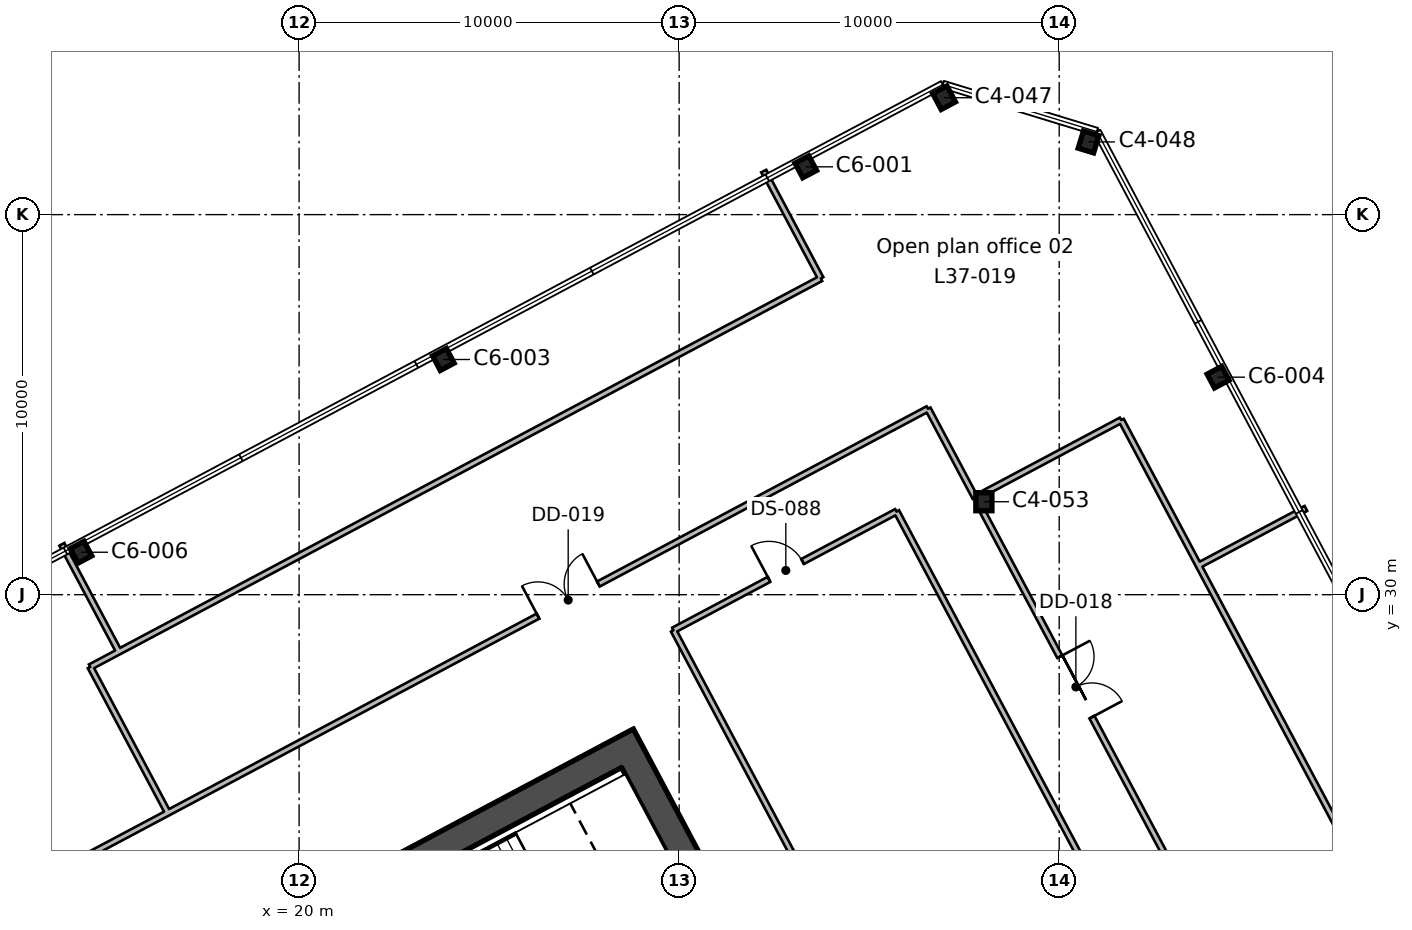
"""IFC4 building model, lengths in metres.
Left out: names, types, materials, properties, quantities, classifications, styles, units other than length and angle.
Written with IfcOpenShell. Run it as: python <this file> out.ifc"""

import sys

from ifc_helpers import new_model, si_unit, direction, frame, frame_2d, origin, origin_2d, place, context, subcontext, project, spatial, rectangle, i_section, extrude, element, fill, save


model = new_model("IFC4")
c1 = context("Model", 3, precision=1e-05, world=origin(), true_north=direction((0.0, 1.0)))
c2 = subcontext(c1, "Body", "Model", "MODEL_VIEW")
j1 = project(units=[si_unit("LENGTHUNIT", "METRE"), si_unit("PLANEANGLEUNIT", "RADIAN")], contexts=[c1])
p1 = place(None, origin())
s1 = spatial("IfcSite", under=j1, at=p1, CompositionType="ELEMENT")
p2 = place(p1, origin())
s2 = spatial("IfcBuilding", under=s1, at=p2, CompositionType="ELEMENT")
p3 = place(p2, frame((0.0, 0.0, 174.2)))
s3 = spatial("IfcBuildingStorey", under=s2, at=p3, CompositionType="ELEMENT", Elevation=174.2)
p4 = place(p3, frame((14.261, 31.117, 0.0), z_axis=(0.0, 0.0, 1.0), x_axis=(-0.882947592859, -0.469471562786, 0.0)))
e1 = element("IfcColumn", 1, at=p4, inside=s3, PredefinedType="COLUMN", context=c2, shape_type="SweptSolid", body=[
    extrude(i_section(OverallWidth=0.412, OverallDepth=0.434, WebThickness=0.036, FlangeThickness=0.057, FilletRadius=0.015, at=origin_2d()), origin(), (0.0, 0.0, 1.0), 4.0),
])
p5 = place(p3, frame((38.018, 32.446, 0.0), z_axis=(0.0, 0.0, 1.0), x_axis=(1.0, 0.0, 0.0)))
e2 = element("IfcColumn", 2, at=p5, inside=s3, PredefinedType="COLUMN", context=c2, shape_type="SweptSolid", body=[
    extrude(i_section(OverallWidth=0.424, OverallDepth=0.475, WebThickness=0.048, FlangeThickness=0.077, FilletRadius=0.015, at=origin_2d()), origin(), (0.0, 0.0, 1.0), 4.0),
])
for number, where, z_axis, x_axis in (
    (3, (44.181, 35.723, 0.0), (0.0, 0.0, 1.0), (-0.469, 0.883, 0.0)),
    (4, (23.796, 36.188, 0.0), (0.0, 0.0, 1.0), (-0.883, -0.469, 0.0)),
    (5, (33.332, 41.258, 0.0), (0.0, 0.0, 1.0), (-0.883, -0.469, 0.0)),
):
    element("IfcColumn", number, at=place(p3, frame(where, z_axis=z_axis, x_axis=x_axis)), inside=s3, PredefinedType="COLUMN", context=c2, shape_type="SweptSolid", body=[
        extrude(i_section(OverallWidth=0.412, OverallDepth=0.434, WebThickness=0.036, FlangeThickness=0.057, FilletRadius=0.015, at=origin_2d()), origin(), (0.0, 0.0, 1.0), 4.0),
    ])
for number, where, z_axis, x_axis in (
    (6, (40.772, 41.913, 0.0), (0.0, 0.0, 1.0), (-0.956, 0.292, 0.0)),
    (7, (36.971, 43.076, 0.0), (0.0, 0.0, 1.0), (-0.883, -0.469, 0.0)),
):
    element("IfcColumn", number, at=place(p3, frame(where, z_axis=z_axis, x_axis=x_axis)), inside=s3, PredefinedType="COLUMN", context=c2, shape_type="SweptSolid", body=[
        extrude(i_section(OverallWidth=0.424, OverallDepth=0.475, WebThickness=0.048, FlangeThickness=0.077, FilletRadius=0.015, at=origin_2d()), origin(), (0.0, 0.0, 1.0), 4.0),
    ])
p6 = place(p3, frame((37.713, 8.896, 0.0), z_axis=(0.0, 0.0, 1.0), x_axis=(-0.469469918705, 0.88294846703, 0.0)))
e8 = element("IfcWall", 8, at=p6, inside=s3, PredefinedType="SHEAR", context=c2, shape_type="SweptSolid", body=[
    extrude(rectangle(XDim=19.7, YDim=0.75, at=frame_2d((9.85, 0.0))), origin(), (0.0, 0.0, 1.0), 4.0),
])
p7 = place(p6, frame((10.45, 0.0, 0.0)))
e9 = element("IfcOpeningElement", 9, at=p7, cuts=e8, PredefinedType="OPENING", context=c2, shape_type="SweptSolid", body=[
    extrude(rectangle(XDim=2.4, YDim=2.4, at=frame_2d((1.2, 1.2))), frame((0.0, 0.385, 0.0), z_axis=(0.0, -1.0, 0.0), x_axis=(1.0, 0.0, 0.0)), (0.0, 0.0, 1.0), 0.77),
])
p8 = place(p3, frame((10.474, 16.3, 0.0), z_axis=(0.0, 0.0, 1.0), x_axis=(0.88295010195, 0.469466843842, 0.0)))
e10 = element("IfcWall", 10, at=p8, inside=s3, PredefinedType="SHEAR", context=c2, shape_type="SweptSolid", body=[
    extrude(rectangle(XDim=20.2, YDim=0.75, at=frame_2d((10.1, 0.0))), origin(), (0.0, 0.0, 1.0), 4.0),
])
p9 = place(p3, frame((0.0, 15.46, 0.0), z_axis=(0.0, 0.0, 1.0), x_axis=(0.882949722977, 0.469467556594, 0.0)))
e11 = element("IfcWall", 11, at=p9, inside=s3, PredefinedType="PARTITIONING", context=c2, shape_type="SweptSolid", body=[
    extrude(rectangle(XDim=20.021, YDim=0.15, at=frame_2d((10.01, 0.0))), origin(), (0.0, 0.0, 1.0), 3.6),
])
p10 = place(p9, frame((9.55, 0.0, 0.0)))
e12 = element("IfcOpeningElement", 12, at=p10, cuts=e11, PredefinedType="OPENING", context=c2, shape_type="SweptSolid", body=[
    extrude(rectangle(XDim=1.0, YDim=2.1, at=frame_2d((0.5, 1.05))), frame((0.0, 0.085, 0.0), z_axis=(0.0, -1.0, 0.0), x_axis=(1.0, 0.0, 0.0)), (0.0, 0.0, 1.0), 0.17),
])
p11 = place(p3, frame((15.761, 25.739, 0.0), z_axis=(0.0, 0.0, 1.0), x_axis=(0.469318416257, -0.883029005278, 0.0)))
e13 = element("IfcWall", 13, at=p11, inside=s3, PredefinedType="PARTITIONING", context=c2, shape_type="SweptSolid", body=[
    extrude(rectangle(XDim=1.677, YDim=0.15, at=frame_2d((0.839, 0.0))), origin(), (0.0, 0.0, 1.0), 3.6),
])
p12 = place(p3, frame((13.757, 31.325, 0.0), z_axis=(0.0, 0.0, 1.0), x_axis=(0.469685095616, -0.882834022315, 0.0)))
e14 = element("IfcWall", 14, at=p12, inside=s3, PredefinedType="PARTITIONING", context=c2, shape_type="SweptSolid", body=[
    extrude(rectangle(XDim=3.2, YDim=0.15, at=frame_2d((1.6, 0.0))), origin(), (0.0, 0.0, 1.0), 3.6),
])
p13 = place(p3, frame((15.258, 28.499, 0.0), z_axis=(0.0, 0.0, 1.0), x_axis=(0.882939918194, 0.469485996447, 0.0)))
e15 = element("IfcWall", 15, at=p13, inside=s3, PredefinedType="PARTITIONING", context=c2, shape_type="SweptSolid", body=[
    extrude(rectangle(XDim=20.919, YDim=0.15, at=frame_2d((10.459, 0.0))), origin(), (0.0, 0.0, 1.0), 3.6),
])
p14 = place(p3, frame((33.728, 38.32, 0.0), z_axis=(0.0, 0.0, 1.0), x_axis=(-0.469320691295, 0.883027796121, 0.0)))
e16 = element("IfcWall", 16, at=p14, inside=s3, PredefinedType="PARTITIONING", context=c2, shape_type="SweptSolid", body=[
    extrude(rectangle(XDim=3.2, YDim=0.15, at=frame_2d((1.6, 0.0))), origin(), (0.0, 0.0, 1.0), 3.6),
])
p15 = place(p3, frame((15.761, 25.739, 0.0), z_axis=(0.0, 0.0, 1.0), x_axis=(-0.469469065188, 0.882948920851, 0.0)))
e17 = element("IfcWall", 17, at=p15, inside=s3, PredefinedType="PARTITIONING", context=c2, shape_type="SweptSolid", body=[
    extrude(rectangle(XDim=2.673, YDim=0.15, at=frame_2d((1.336, 0.0))), origin(), (0.0, 0.0, 1.0), 3.6),
])
p16 = place(p3, frame((14.506, 28.099, 0.0), z_axis=(0.0, 0.0, 1.0), x_axis=(0.882907789101, 0.469546415113, 0.0)))
e18 = element("IfcWall", 18, at=p16, inside=s3, PredefinedType="PARTITIONING", context=c2, shape_type="SweptSolid", body=[
    extrude(rectangle(XDim=0.852, YDim=0.15, at=frame_2d((0.426, 0.0))), origin(), (0.0, 0.0, 1.0), 3.6),
])
p17 = place(p3, frame((37.789, 32.556, 0.0), z_axis=(0.0, 0.0, 1.0), x_axis=(-0.469764435481, 0.882791807369, 0.0)))
e19 = element("IfcWall", 19, at=p17, inside=s3, PredefinedType="PARTITIONING", context=c2, shape_type="SweptSolid", body=[
    extrude(rectangle(XDim=2.646, YDim=0.15, at=frame_2d((1.323, 0.0))), origin(), (0.0, 0.0, 1.0), 3.6),
])
p18 = place(p3, frame((17.677, 24.859, 0.0), z_axis=(0.0, 0.0, 1.0), x_axis=(0.882951785412, 0.469463677655, 0.0)))
e20 = element("IfcWall", 20, at=p18, inside=s3, PredefinedType="PARTITIONING", context=c2, shape_type="SweptSolid", body=[
    extrude(rectangle(XDim=21.372, YDim=0.15, at=frame_2d((10.686, 0.0))), origin(), (0.0, 0.0, 1.0), 3.6),
])
p19 = place(p18, frame((9.75, 0.0, 0.0)))
e21 = element("IfcOpeningElement", 21, at=p19, cuts=e20, PredefinedType="OPENING", context=c2, shape_type="SweptSolid", body=[
    extrude(rectangle(XDim=1.8, YDim=2.1, at=frame_2d((0.9, 1.05))), frame((0.0, 0.085, 0.0), z_axis=(0.0, -1.0, 0.0), x_axis=(1.0, 0.0, 0.0)), (0.0, 0.0, 1.0), 0.17),
])
p20 = place(p3, frame((37.974, 32.209, 0.0), z_axis=(0.0, 0.0, 1.0), x_axis=(0.469434985691, -0.882967040274, 0.0)))
e22 = element("IfcWall", 22, at=p20, inside=s3, PredefinedType="PARTITIONING", context=c2, shape_type="SweptSolid", body=[
    extrude(rectangle(XDim=10.442, YDim=0.15, at=frame_2d((5.221, 0.0))), origin(), (0.0, 0.0, 1.0), 3.6),
])
p21 = place(p20, frame((4.351, 0.0, 0.0)))
e23 = element("IfcOpeningElement", 23, at=p21, cuts=e22, PredefinedType="OPENING", context=c2, shape_type="SweptSolid", body=[
    extrude(rectangle(XDim=1.8, YDim=2.1, at=frame_2d((0.9, 1.05))), frame((0.0, 0.085, 0.0), z_axis=(0.0, -1.0, 0.0), x_axis=(1.0, 0.0, 0.0)), (0.0, 0.0, 1.0), 0.17),
])
p22 = place(p3, frame((43.641, 30.817, 0.0), z_axis=(0.0, 0.0, 1.0), x_axis=(-0.469601615988, 0.882878430058, 0.0)))
e24 = element("IfcWall", 24, at=p22, inside=s3, PredefinedType="PARTITIONING", context=c2, shape_type="SweptSolid", body=[
    extrude(rectangle(XDim=4.278, YDim=0.15, at=frame_2d((2.139, 0.0))), origin(), (0.0, 0.0, 1.0), 3.6),
])
p23 = place(p3, frame((41.632, 34.594, 0.0), z_axis=(0.0, 0.0, 1.0), x_axis=(-0.88295491585, -0.469457789984, 0.0)))
e25 = element("IfcWall", 25, at=p23, inside=s3, PredefinedType="PARTITIONING", context=c2, shape_type="SweptSolid", body=[
    extrude(rectangle(XDim=4.07, YDim=0.15, at=frame_2d((2.035, 0.0))), origin(), (0.0, 0.0, 1.0), 3.6),
])
p24 = place(p3, frame((43.641, 30.817, 0.0), z_axis=(0.0, 0.0, 1.0), x_axis=(0.469460355779, -0.882953551639, 0.0)))
e26 = element("IfcWall", 26, at=p24, inside=s3, PredefinedType="PARTITIONING", context=c2, shape_type="SweptSolid", body=[
    extrude(rectangle(XDim=25.231, YDim=0.15, at=frame_2d((12.615, 0.0))), origin(), (0.0, 0.0, 1.0), 3.6),
])
p25 = place(p3, frame((46.492, 32.27, 0.0), z_axis=(0.0, 0.0, 1.0), x_axis=(-0.883027796121, -0.469320691295, 0.0)))
e27 = element("IfcWall", 27, at=p25, inside=s3, PredefinedType="PARTITIONING", context=c2, shape_type="SweptSolid", body=[
    extrude(rectangle(XDim=3.2, YDim=0.15, at=frame_2d((1.6, 0.0))), origin(), (0.0, 0.0, 1.0), 3.6),
])
p26 = place(p3, frame((29.849, 29.065, 0.0), z_axis=(0.0, 0.0, 1.0), x_axis=(0.882917406039, 0.469528331535, 0.0)))
e28 = element("IfcWall", 28, at=p26, inside=s3, PredefinedType="PARTITIONING", context=c2, shape_type="SweptSolid", body=[
    extrude(rectangle(XDim=6.649, YDim=0.15, at=frame_2d((3.325, 0.0))), origin(), (0.0, 0.0, 1.0), 3.6),
])
p27 = place(p26, frame((2.85, 0.0, 0.0)))
e29 = element("IfcOpeningElement", 29, at=p27, cuts=e28, PredefinedType="OPENING", context=c2, shape_type="SweptSolid", body=[
    extrude(rectangle(XDim=1.0, YDim=2.1, at=frame_2d((0.5, 1.05))), frame((0.0, 0.085, 0.0), z_axis=(0.0, -1.0, 0.0), x_axis=(1.0, 0.0, 0.0)), (0.0, 0.0, 1.0), 0.17),
])
p28 = place(p3, frame((35.72, 32.187, 0.0), z_axis=(0.0, 0.0, 1.0), x_axis=(0.469474204504, -0.882946188227, 0.0)))
e30 = element("IfcWall", 30, at=p28, inside=s3, PredefinedType="PARTITIONING", context=c2, shape_type="SweptSolid", body=[
    extrude(rectangle(XDim=21.301, YDim=0.15, at=frame_2d((10.65, 0.0))), origin(), (0.0, 0.0, 1.0), 3.6),
])
p29 = place(p3, frame((39.848, 10.258, 0.0), z_axis=(0.0, 0.0, 1.0), x_axis=(-0.469434276041, 0.882967417563, 0.0)))
e31 = element("IfcWall", 31, at=p29, inside=s3, PredefinedType="PARTITIONING", context=c2, shape_type="SweptSolid", body=[
    extrude(rectangle(XDim=21.3, YDim=0.15, at=frame_2d((10.65, 0.0))), origin(), (0.0, 0.0, 1.0), 3.6),
])
p30 = place(p21, origin())
e32 = element("IfcDoor", 32, at=p30, inside=s3, OperationType="DOUBLE_DOOR_SINGLE_SWING", PredefinedType="DOOR", context=c2, shape_type="SweptSolid", body=[
    extrude(rectangle(XDim=1.8, YDim=2.1, at=frame_2d((0.9, 1.05))), frame((0.0, 0.025, 0.0), z_axis=(0.0, -1.0, 0.0), x_axis=(1.0, 0.0, 0.0)), (0.0, 0.0, 1.0), 0.05),
])
fill(e23, e32)
p31 = place(p19, origin())
e33 = element("IfcDoor", 33, at=p31, inside=s3, OperationType="DOUBLE_DOOR_SINGLE_SWING", PredefinedType="DOOR", context=c2, shape_type="SweptSolid", body=[
    extrude(rectangle(XDim=1.8, YDim=2.1, at=frame_2d((0.9, 1.05))), frame((0.0, 0.025, 0.0), z_axis=(0.0, -1.0, 0.0), x_axis=(1.0, 0.0, 0.0)), (0.0, 0.0, 1.0), 0.05),
])
fill(e21, e33)
p32 = place(p27, origin())
e34 = element("IfcDoor", 34, at=p32, inside=s3, OperationType="SINGLE_SWING_LEFT", PredefinedType="DOOR", context=c2, shape_type="SweptSolid", body=[
    extrude(rectangle(XDim=1.0, YDim=2.1, at=frame_2d((0.5, 1.05))), frame((0.0, 0.025, 0.0), z_axis=(0.0, -1.0, 0.0), x_axis=(1.0, 0.0, 0.0)), (0.0, 0.0, 1.0), 0.05),
])
fill(e29, e34)
save(model, sys.argv[1])
